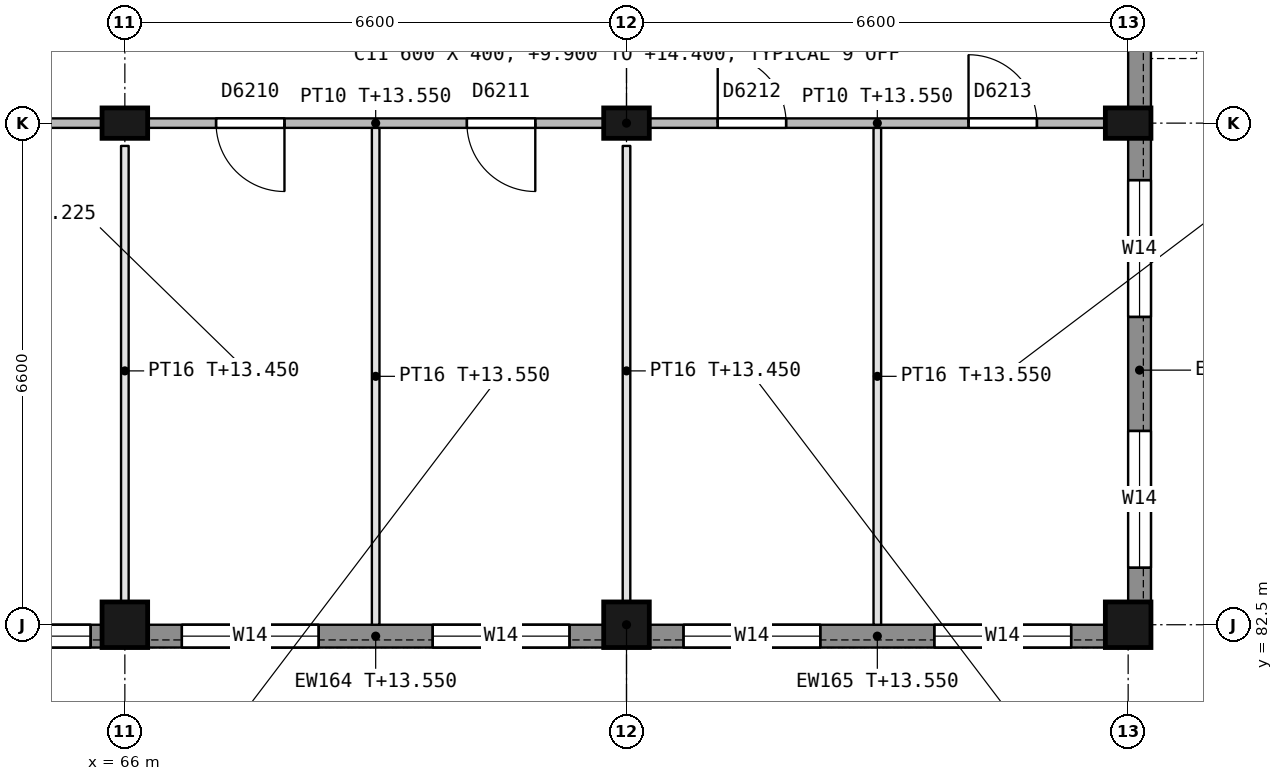
"""IFC4 building model, lengths in metres.
Left out: names, types, materials, properties, quantities, classifications, styles, units other than length and angle.
Written with IfcOpenShell. Run it as: python <this file> out.ifc"""

import sys

from ifc_helpers import new_model, si_unit, direction, frame, frame_2d, origin, origin_2d, place, context, subcontext, project, spatial, rectangle, extrude, element, fill, save


model = new_model("IFC4")
c1 = context("Model", 3, precision=1e-05, world=origin(), true_north=direction((0.0, 1.0)))
c2 = subcontext(c1, "Body", "Model", "MODEL_VIEW")
j1 = project(units=[si_unit("LENGTHUNIT", "METRE"), si_unit("PLANEANGLEUNIT", "RADIAN")], contexts=[c1])
p1 = place(None, origin())
s1 = spatial("IfcSite", under=j1, at=p1, CompositionType="ELEMENT")
p2 = place(p1, origin())
s2 = spatial("IfcBuilding", under=s1, at=p2, CompositionType="ELEMENT")
p3 = place(p2, frame((0.0, 0.0, 9.9)))
s3 = spatial("IfcBuildingStorey", under=s2, at=p3, CompositionType="ELEMENT", Elevation=9.9)
p4 = place(p3, frame((66.0, 82.5, 0.0), z_axis=(0.0, 0.0, 1.0), x_axis=(1.0, 0.0, 0.0)))
e1 = element("IfcColumn", 1, at=p4, inside=s3, PredefinedType="COLUMN", context=c2, shape_type="SweptSolid", body=[
    extrude(rectangle(XDim=0.6, YDim=0.6, at=origin_2d()), origin(), (0.0, 0.0, 1.0), 4.5),
])
p5 = place(p3, frame((66.0, 89.1, 0.0), z_axis=(0.0, 0.0, 1.0), x_axis=(1.0, 0.0, 0.0)))
e2 = element("IfcColumn", 2, at=p5, inside=s3, PredefinedType="COLUMN", context=c2, shape_type="SweptSolid", body=[
    extrude(rectangle(XDim=0.6, YDim=0.4, at=origin_2d()), origin(), (0.0, 0.0, 1.0), 4.5),
])
p6 = place(p3, frame((72.6, 82.5, 0.0), z_axis=(0.0, 0.0, 1.0), x_axis=(1.0, 0.0, 0.0)))
e3 = element("IfcColumn", 3, at=p6, inside=s3, PredefinedType="COLUMN", context=c2, shape_type="SweptSolid", body=[
    extrude(rectangle(XDim=0.6, YDim=0.6, at=origin_2d()), origin(), (0.0, 0.0, 1.0), 4.5),
])
p7 = place(p3, frame((72.6, 89.1, 0.0), z_axis=(0.0, 0.0, 1.0), x_axis=(1.0, 0.0, 0.0)))
e4 = element("IfcColumn", 4, at=p7, inside=s3, PredefinedType="COLUMN", context=c2, shape_type="SweptSolid", body=[
    extrude(rectangle(XDim=0.6, YDim=0.4, at=origin_2d()), origin(), (0.0, 0.0, 1.0), 4.5),
])
p8 = place(p3, frame((79.2, 82.5, 0.0), z_axis=(0.0, 0.0, 1.0), x_axis=(1.0, 0.0, 0.0)))
e5 = element("IfcColumn", 5, at=p8, inside=s3, PredefinedType="COLUMN", context=c2, shape_type="SweptSolid", body=[
    extrude(rectangle(XDim=0.6, YDim=0.6, at=origin_2d()), origin(), (0.0, 0.0, 1.0), 4.5),
])
p9 = place(p3, frame((79.2, 89.1, 0.0), z_axis=(0.0, 0.0, 1.0), x_axis=(1.0, 0.0, 0.0)))
e6 = element("IfcColumn", 6, at=p9, inside=s3, PredefinedType="COLUMN", context=c2, shape_type="SweptSolid", body=[
    extrude(rectangle(XDim=0.6, YDim=0.4, at=origin_2d()), origin(), (0.0, 0.0, 1.0), 4.5),
])
p10 = place(p3, frame((79.35, 88.9, 0.0), z_axis=(0.0, 0.0, 1.0), x_axis=(0.0, -1.0, 0.0)))
e7 = element("IfcWall", 7, at=p10, inside=s3, PredefinedType="STANDARD", context=c2, shape_type="SweptSolid", body=[
    extrude(rectangle(XDim=6.1, YDim=0.3, at=frame_2d((3.05, 0.0))), origin(), (0.0, 0.0, 1.0), 3.65),
])
p11 = place(p10, frame((3.85, 0.0, 0.9)))
e8 = element("IfcOpeningElement", 8, at=p11, cuts=e7, PredefinedType="OPENING", context=c2, shape_type="SweptSolid", body=[
    extrude(rectangle(XDim=1.8, YDim=1.5, at=frame_2d((0.9, 0.75))), frame((0.0, 0.16, 0.0), z_axis=(0.0, -1.0, 0.0), x_axis=(1.0, 0.0, 0.0)), (0.0, 0.0, 1.0), 0.32),
])
p12 = place(p10, frame((0.55, 0.0, 0.9)))
e9 = element("IfcOpeningElement", 9, at=p12, cuts=e7, PredefinedType="OPENING", context=c2, shape_type="SweptSolid", body=[
    extrude(rectangle(XDim=1.8, YDim=1.5, at=frame_2d((0.9, 0.75))), frame((0.0, 0.16, 0.0), z_axis=(0.0, -1.0, 0.0), x_axis=(1.0, 0.0, 0.0)), (0.0, 0.0, 1.0), 0.32),
])
p13 = place(p3, frame((79.35, 92.4, 0.0), z_axis=(0.0, 0.0, 1.0), x_axis=(0.0, -1.0, 0.0)))
e10 = element("IfcWall", 10, at=p13, inside=s3, PredefinedType="STANDARD", context=c2, shape_type="SweptSolid", body=[
    extrude(rectangle(XDim=3.1, YDim=0.3, at=frame_2d((1.55, 0.0))), origin(), (0.0, 0.0, 1.0), 3.65),
])
p14 = place(p13, frame((1.05, 0.0, 1.1)))
e11 = element("IfcOpeningElement", 11, at=p14, cuts=e10, PredefinedType="OPENING", context=c2, shape_type="SweptSolid", body=[
    extrude(rectangle(XDim=1.2, YDim=1.2, at=frame_2d((0.6, 0.6))), frame((0.0, 0.16, 0.0), z_axis=(0.0, -1.0, 0.0), x_axis=(1.0, 0.0, 0.0)), (0.0, 0.0, 1.0), 0.32),
])
p15 = place(p3, frame((65.7, 82.35, 0.0), z_axis=(0.0, 0.0, 1.0), x_axis=(-1.0, 0.0, 0.0)))
e12 = element("IfcWall", 12, at=p15, inside=s3, PredefinedType="STANDARD", context=c2, shape_type="SweptSolid", body=[
    extrude(rectangle(XDim=6.0, YDim=0.3, at=frame_2d((3.0, 0.0))), origin(), (0.0, 0.0, 1.0), 3.65),
])
p16 = place(p15, frame((3.45, 0.0, 0.9)))
e13 = element("IfcOpeningElement", 13, at=p16, cuts=e12, PredefinedType="OPENING", context=c2, shape_type="SweptSolid", body=[
    extrude(rectangle(XDim=2.4, YDim=1.8, at=frame_2d((1.2, 0.9))), frame((0.0, 0.16, 0.0), z_axis=(0.0, -1.0, 0.0), x_axis=(1.0, 0.0, 0.0)), (0.0, 0.0, 1.0), 0.32),
])
p17 = place(p15, frame((0.15, 0.0, 0.9)))
e14 = element("IfcOpeningElement", 14, at=p17, cuts=e12, PredefinedType="OPENING", context=c2, shape_type="SweptSolid", body=[
    extrude(rectangle(XDim=2.4, YDim=1.8, at=frame_2d((1.2, 0.9))), frame((0.0, 0.16, 0.0), z_axis=(0.0, -1.0, 0.0), x_axis=(1.0, 0.0, 0.0)), (0.0, 0.0, 1.0), 0.32),
])
p18 = place(p3, frame((72.3, 82.35, 0.0), z_axis=(0.0, 0.0, 1.0), x_axis=(-1.0, 0.0, 0.0)))
e15 = element("IfcWall", 15, at=p18, inside=s3, PredefinedType="STANDARD", context=c2, shape_type="SweptSolid", body=[
    extrude(rectangle(XDim=6.0, YDim=0.3, at=frame_2d((3.0, 0.0))), origin(), (0.0, 0.0, 1.0), 3.65),
])
p19 = place(p18, frame((3.75, 0.0, 0.9)))
e16 = element("IfcOpeningElement", 16, at=p19, cuts=e15, PredefinedType="OPENING", context=c2, shape_type="SweptSolid", body=[
    extrude(rectangle(XDim=1.8, YDim=1.5, at=frame_2d((0.9, 0.75))), frame((0.0, 0.16, 0.0), z_axis=(0.0, -1.0, 0.0), x_axis=(1.0, 0.0, 0.0)), (0.0, 0.0, 1.0), 0.32),
])
p20 = place(p18, frame((0.45, 0.0, 0.9)))
e17 = element("IfcOpeningElement", 17, at=p20, cuts=e15, PredefinedType="OPENING", context=c2, shape_type="SweptSolid", body=[
    extrude(rectangle(XDim=1.8, YDim=1.5, at=frame_2d((0.9, 0.75))), frame((0.0, 0.16, 0.0), z_axis=(0.0, -1.0, 0.0), x_axis=(1.0, 0.0, 0.0)), (0.0, 0.0, 1.0), 0.32),
])
p21 = place(p3, frame((78.9, 82.35, 0.0), z_axis=(0.0, 0.0, 1.0), x_axis=(-1.0, 0.0, 0.0)))
e18 = element("IfcWall", 18, at=p21, inside=s3, PredefinedType="STANDARD", context=c2, shape_type="SweptSolid", body=[
    extrude(rectangle(XDim=6.0, YDim=0.3, at=frame_2d((3.0, 0.0))), origin(), (0.0, 0.0, 1.0), 3.65),
])
p22 = place(p21, frame((3.75, 0.0, 0.9)))
e19 = element("IfcOpeningElement", 19, at=p22, cuts=e18, PredefinedType="OPENING", context=c2, shape_type="SweptSolid", body=[
    extrude(rectangle(XDim=1.8, YDim=1.5, at=frame_2d((0.9, 0.75))), frame((0.0, 0.16, 0.0), z_axis=(0.0, -1.0, 0.0), x_axis=(1.0, 0.0, 0.0)), (0.0, 0.0, 1.0), 0.32),
])
p23 = place(p21, frame((0.45, 0.0, 0.9)))
e20 = element("IfcOpeningElement", 20, at=p23, cuts=e18, PredefinedType="OPENING", context=c2, shape_type="SweptSolid", body=[
    extrude(rectangle(XDim=1.8, YDim=1.5, at=frame_2d((0.9, 0.75))), frame((0.0, 0.16, 0.0), z_axis=(0.0, -1.0, 0.0), x_axis=(1.0, 0.0, 0.0)), (0.0, 0.0, 1.0), 0.32),
])
p24 = place(p3, frame((59.7, 89.1, 0.0), z_axis=(0.0, 0.0, 1.0), x_axis=(1.0, 0.0, 0.0)))
e21 = element("IfcWall", 21, at=p24, inside=s3, PredefinedType="PARTITIONING", context=c2, shape_type="SweptSolid", body=[
    extrude(rectangle(XDim=6.0, YDim=0.125, at=frame_2d((3.0, 0.0))), origin(), (0.0, 0.0, 1.0), 3.65),
])
p25 = place(p3, frame((72.3, 89.1, 0.0), z_axis=(0.0, 0.0, 1.0), x_axis=(-1.0, 0.0, 0.0)))
e22 = element("IfcWall", 22, at=p25, inside=s3, PredefinedType="PARTITIONING", context=c2, shape_type="SweptSolid", body=[
    extrude(rectangle(XDim=6.0, YDim=0.125, at=frame_2d((3.0, 0.0))), origin(), (0.0, 0.0, 1.0), 3.65),
])
p26 = place(p25, frame((4.2, 0.0, 0.0)))
e23 = element("IfcOpeningElement", 23, at=p26, cuts=e22, PredefinedType="OPENING", context=c2, shape_type="SweptSolid", body=[
    extrude(rectangle(XDim=0.9, YDim=2.1, at=frame_2d((0.45, 1.05))), frame((0.0, 0.073, 0.0), z_axis=(0.0, -1.0, 0.0), x_axis=(1.0, 0.0, 0.0)), (0.0, 0.0, 1.0), 0.145),
])
p27 = place(p25, frame((0.9, 0.0, 0.0)))
e24 = element("IfcOpeningElement", 24, at=p27, cuts=e22, PredefinedType="OPENING", context=c2, shape_type="SweptSolid", body=[
    extrude(rectangle(XDim=0.9, YDim=2.1, at=frame_2d((0.45, 1.05))), frame((0.0, 0.073, 0.0), z_axis=(0.0, -1.0, 0.0), x_axis=(1.0, 0.0, 0.0)), (0.0, 0.0, 1.0), 0.145),
])
p28 = place(p3, frame((78.9, 89.1, 0.0), z_axis=(0.0, 0.0, 1.0), x_axis=(-1.0, 0.0, 0.0)))
e25 = element("IfcWall", 25, at=p28, inside=s3, PredefinedType="PARTITIONING", context=c2, shape_type="SweptSolid", body=[
    extrude(rectangle(XDim=6.0, YDim=0.125, at=frame_2d((3.0, 0.0))), origin(), (0.0, 0.0, 1.0), 3.65),
])
p29 = place(p28, frame((4.2, 0.0, 0.0)))
e26 = element("IfcOpeningElement", 26, at=p29, cuts=e25, PredefinedType="OPENING", context=c2, shape_type="SweptSolid", body=[
    extrude(rectangle(XDim=0.9, YDim=2.1, at=frame_2d((0.45, 1.05))), frame((0.0, 0.073, 0.0), z_axis=(0.0, -1.0, 0.0), x_axis=(1.0, 0.0, 0.0)), (0.0, 0.0, 1.0), 0.145),
])
p30 = place(p28, frame((0.9, 0.0, 0.0)))
e27 = element("IfcOpeningElement", 27, at=p30, cuts=e25, PredefinedType="OPENING", context=c2, shape_type="SweptSolid", body=[
    extrude(rectangle(XDim=0.9, YDim=2.1, at=frame_2d((0.45, 1.05))), frame((0.0, 0.073, 0.0), z_axis=(0.0, -1.0, 0.0), x_axis=(1.0, 0.0, 0.0)), (0.0, 0.0, 1.0), 0.145),
])
p31 = place(p3, frame((66.0, 82.8, 0.0), z_axis=(0.0, 0.0, 1.0), x_axis=(0.0, 1.0, 0.0)))
e28 = element("IfcWall", 28, at=p31, inside=s3, PredefinedType="PARTITIONING", context=c2, shape_type="SweptSolid", body=[
    extrude(rectangle(XDim=6.0, YDim=0.1, at=frame_2d((3.0, 0.0))), origin(), (0.0, 0.0, 1.0), 3.55),
])
p32 = place(p3, frame((69.3, 82.5, 0.0), z_axis=(0.0, 0.0, 1.0), x_axis=(0.0, 1.0, 0.0)))
e29 = element("IfcWall", 29, at=p32, inside=s3, PredefinedType="PARTITIONING", context=c2, shape_type="SweptSolid", body=[
    extrude(rectangle(XDim=6.537, YDim=0.1, at=frame_2d((3.269, 0.0))), origin(), (0.0, 0.0, 1.0), 3.65),
])
p33 = place(p3, frame((72.6, 82.8, 0.0), z_axis=(0.0, 0.0, 1.0), x_axis=(0.0, 1.0, 0.0)))
e30 = element("IfcWall", 30, at=p33, inside=s3, PredefinedType="PARTITIONING", context=c2, shape_type="SweptSolid", body=[
    extrude(rectangle(XDim=6.0, YDim=0.1, at=frame_2d((3.0, 0.0))), origin(), (0.0, 0.0, 1.0), 3.55),
])
p34 = place(p3, frame((75.9, 82.5, 0.0), z_axis=(0.0, 0.0, 1.0), x_axis=(0.0, 1.0, 0.0)))
e31 = element("IfcWall", 31, at=p34, inside=s3, PredefinedType="PARTITIONING", context=c2, shape_type="SweptSolid", body=[
    extrude(rectangle(XDim=6.537, YDim=0.1, at=frame_2d((3.269, 0.0))), origin(), (0.0, 0.0, 1.0), 3.65),
])
p35 = place(p11, origin())
e32 = element("IfcWindow", 32, at=p35, inside=s3, PartitioningType="SINGLE_PANEL", PredefinedType="WINDOW", context=c2, shape_type="SweptSolid", body=[
    extrude(rectangle(XDim=1.8, YDim=1.5, at=frame_2d((0.9, 0.75))), frame((0.0, 0.03, 0.0), z_axis=(0.0, -1.0, 0.0), x_axis=(1.0, 0.0, 0.0)), (0.0, 0.0, 1.0), 0.06),
])
fill(e8, e32)
p36 = place(p12, origin())
e33 = element("IfcWindow", 33, at=p36, inside=s3, PartitioningType="SINGLE_PANEL", PredefinedType="WINDOW", context=c2, shape_type="SweptSolid", body=[
    extrude(rectangle(XDim=1.8, YDim=1.5, at=frame_2d((0.9, 0.75))), frame((0.0, 0.03, 0.0), z_axis=(0.0, -1.0, 0.0), x_axis=(1.0, 0.0, 0.0)), (0.0, 0.0, 1.0), 0.06),
])
fill(e9, e33)
p37 = place(p17, origin())
e34 = element("IfcWindow", 34, at=p37, inside=s3, PartitioningType="SINGLE_PANEL", PredefinedType="WINDOW", context=c2, shape_type="SweptSolid", body=[
    extrude(rectangle(XDim=2.4, YDim=1.8, at=frame_2d((1.2, 0.9))), frame((0.0, 0.03, 0.0), z_axis=(0.0, -1.0, 0.0), x_axis=(1.0, 0.0, 0.0)), (0.0, 0.0, 1.0), 0.06),
])
fill(e14, e34)
p38 = place(p19, origin())
e35 = element("IfcWindow", 35, at=p38, inside=s3, PartitioningType="SINGLE_PANEL", PredefinedType="WINDOW", context=c2, shape_type="SweptSolid", body=[
    extrude(rectangle(XDim=1.8, YDim=1.5, at=frame_2d((0.9, 0.75))), frame((0.0, 0.03, 0.0), z_axis=(0.0, -1.0, 0.0), x_axis=(1.0, 0.0, 0.0)), (0.0, 0.0, 1.0), 0.06),
])
fill(e16, e35)
p39 = place(p20, origin())
e36 = element("IfcWindow", 36, at=p39, inside=s3, PartitioningType="SINGLE_PANEL", PredefinedType="WINDOW", context=c2, shape_type="SweptSolid", body=[
    extrude(rectangle(XDim=1.8, YDim=1.5, at=frame_2d((0.9, 0.75))), frame((0.0, 0.03, 0.0), z_axis=(0.0, -1.0, 0.0), x_axis=(1.0, 0.0, 0.0)), (0.0, 0.0, 1.0), 0.06),
])
fill(e17, e36)
p40 = place(p22, origin())
e37 = element("IfcWindow", 37, at=p40, inside=s3, PartitioningType="SINGLE_PANEL", PredefinedType="WINDOW", context=c2, shape_type="SweptSolid", body=[
    extrude(rectangle(XDim=1.8, YDim=1.5, at=frame_2d((0.9, 0.75))), frame((0.0, 0.03, 0.0), z_axis=(0.0, -1.0, 0.0), x_axis=(1.0, 0.0, 0.0)), (0.0, 0.0, 1.0), 0.06),
])
fill(e19, e37)
p41 = place(p23, origin())
e38 = element("IfcWindow", 38, at=p41, inside=s3, PartitioningType="SINGLE_PANEL", PredefinedType="WINDOW", context=c2, shape_type="SweptSolid", body=[
    extrude(rectangle(XDim=1.8, YDim=1.5, at=frame_2d((0.9, 0.75))), frame((0.0, 0.03, 0.0), z_axis=(0.0, -1.0, 0.0), x_axis=(1.0, 0.0, 0.0)), (0.0, 0.0, 1.0), 0.06),
])
fill(e20, e38)
p42 = place(p26, origin())
e39 = element("IfcDoor", 39, at=p42, inside=s3, OperationType="SINGLE_SWING_LEFT", PredefinedType="DOOR", context=c2, shape_type="SweptSolid", body=[
    extrude(rectangle(XDim=0.9, YDim=2.1, at=frame_2d((0.45, 1.05))), frame((0.0, 0.025, 0.0), z_axis=(0.0, -1.0, 0.0), x_axis=(1.0, 0.0, 0.0)), (0.0, 0.0, 1.0), 0.05),
])
fill(e23, e39)
p43 = place(p27, origin())
e40 = element("IfcDoor", 40, at=p43, inside=s3, OperationType="SINGLE_SWING_LEFT", PredefinedType="DOOR", context=c2, shape_type="SweptSolid", body=[
    extrude(rectangle(XDim=0.9, YDim=2.1, at=frame_2d((0.45, 1.05))), frame((0.0, 0.025, 0.0), z_axis=(0.0, -1.0, 0.0), x_axis=(1.0, 0.0, 0.0)), (0.0, 0.0, 1.0), 0.05),
])
fill(e24, e40)
p44 = place(p29, origin())
e41 = element("IfcDoor", 41, at=p44, inside=s3, OperationType="SINGLE_SWING_RIGHT", PredefinedType="DOOR", context=c2, shape_type="SweptSolid", body=[
    extrude(rectangle(XDim=0.9, YDim=2.1, at=frame_2d((0.45, 1.05))), frame((0.0, 0.025, 0.0), z_axis=(0.0, -1.0, 0.0), x_axis=(1.0, 0.0, 0.0)), (0.0, 0.0, 1.0), 0.05),
])
fill(e26, e41)
p45 = place(p30, origin())
e42 = element("IfcDoor", 42, at=p45, inside=s3, OperationType="SINGLE_SWING_RIGHT", PredefinedType="DOOR", context=c2, shape_type="SweptSolid", body=[
    extrude(rectangle(XDim=0.9, YDim=2.1, at=frame_2d((0.45, 1.05))), frame((0.0, 0.025, 0.0), z_axis=(0.0, -1.0, 0.0), x_axis=(1.0, 0.0, 0.0)), (0.0, 0.0, 1.0), 0.05),
])
fill(e27, e42)
save(model, sys.argv[1])
